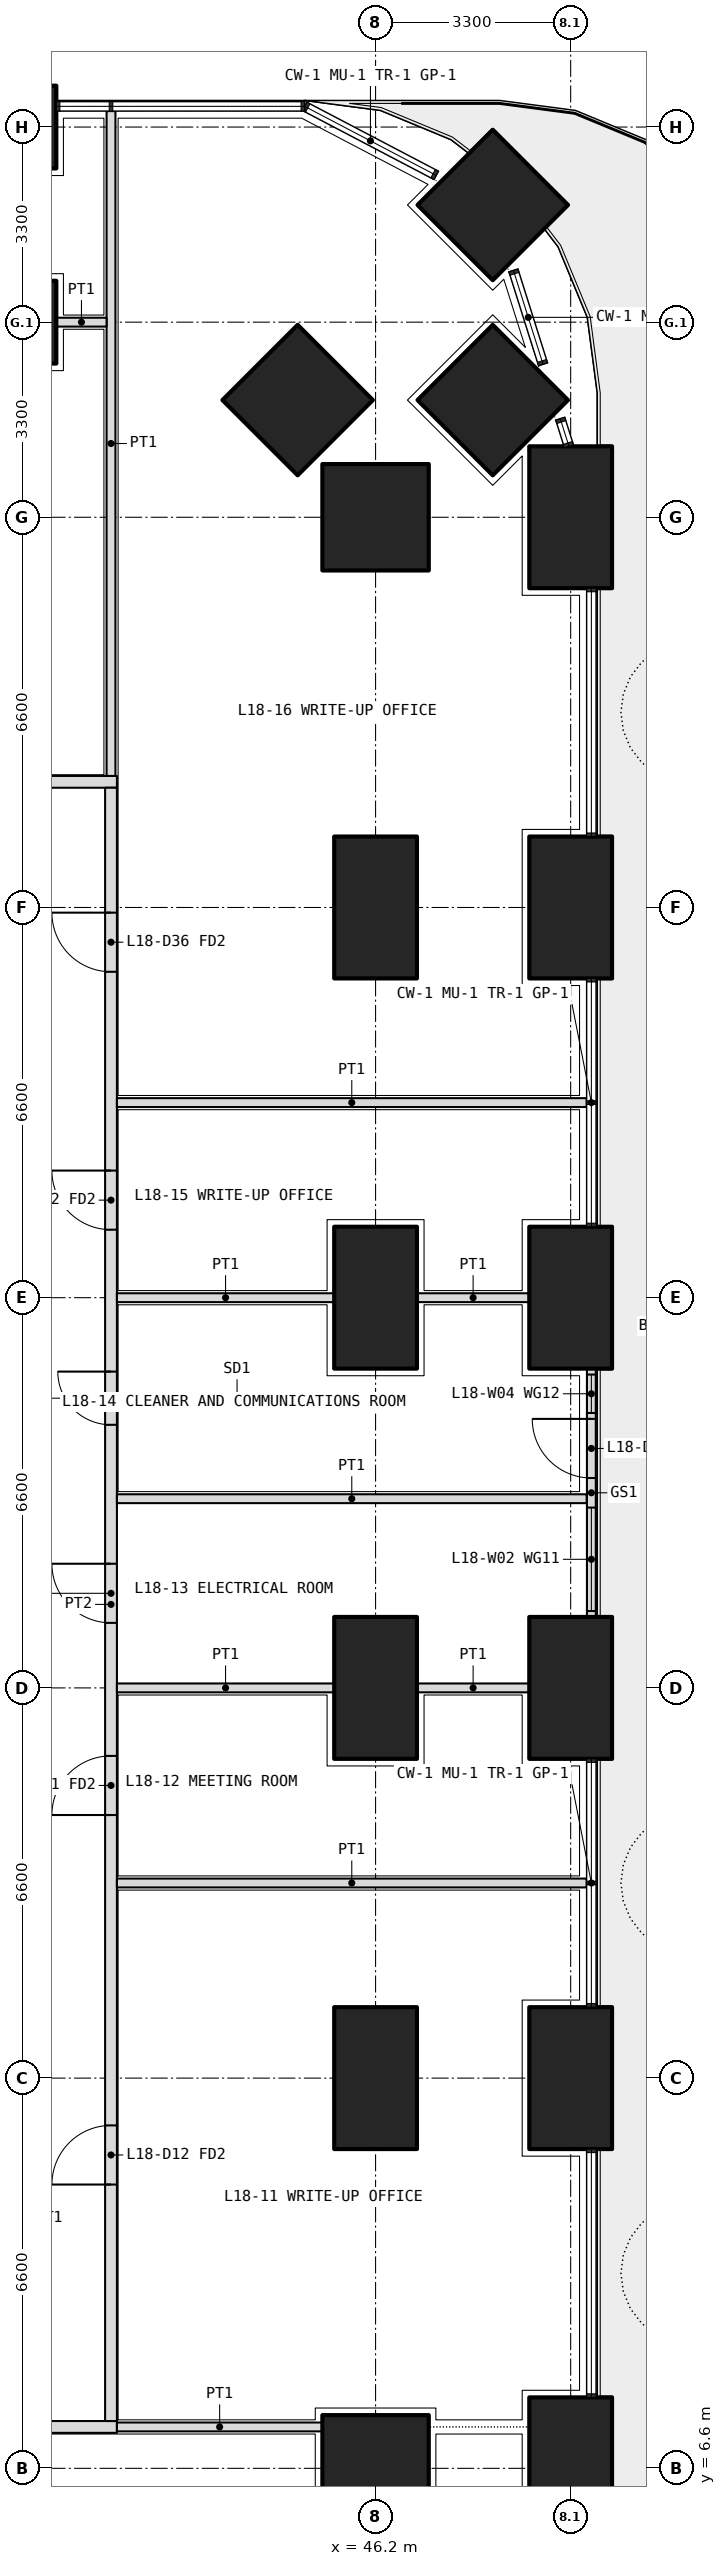
"""IFC4 building model, lengths in metres.
Left out: names, types, materials, properties, quantities, classifications, styles, units other than length and angle.
Written with IfcOpenShell. Run it as: python <this file> out.ifc"""

import sys

from ifc_helpers import new_model, si_unit, direction, frame, frame_2d, origin, origin_2d, place, context, subcontext, project, spatial, rectangle, extrude, element, fill, save


model = new_model("IFC4")
c1 = context("Model", 3, precision=1e-05, world=origin(), true_north=direction((0.0, 1.0)))
c2 = subcontext(c1, "Body", "Model", "MODEL_VIEW")
j1 = project(units=[si_unit("LENGTHUNIT", "METRE"), si_unit("PLANEANGLEUNIT", "RADIAN")], contexts=[c1])
p1 = place(None, origin())
s1 = spatial("IfcSite", under=j1, at=p1, CompositionType="ELEMENT")
p2 = place(p1, origin())
s2 = spatial("IfcBuilding", under=s1, at=p2, CompositionType="ELEMENT")
p3 = place(p2, frame((0.0, 0.0, 82.2)))
s3 = spatial("IfcBuildingStorey", under=s2, at=p3, CompositionType="ELEMENT", Elevation=82.2)
p4 = place(p3, frame((48.182, 44.882, 0.0), z_axis=(0.0, 0.0, 1.0), x_axis=(0.707106781187, 0.707106781187, 0.0)))
e1 = element("IfcColumn", 1, at=p4, inside=s3, PredefinedType="COLUMN", context=c2, shape_type="SweptSolid", body=[
    extrude(rectangle(XDim=1.8, YDim=1.8, at=origin_2d()), origin(), (0.0, 0.0, 1.0), 4.2),
])
for number, where, z_axis, x_axis in (
    (2, (49.5, 6.6, 0.0), (0.0, 0.0, 1.0), (0.0, 1.0, 0.0)),
    (3, (49.5, 13.2, 0.0), (0.0, 0.0, 1.0), (0.0, 1.0, 0.0)),
    (4, (49.5, 19.8, 0.0), (0.0, 0.0, 1.0), (0.0, 1.0, 0.0)),
    (5, (49.5, 26.4, 0.0), (0.0, 0.0, 1.0), (0.0, 1.0, 0.0)),
    (6, (49.5, 33.0, 0.0), (0.0, 0.0, 1.0), (0.0, 1.0, 0.0)),
    (7, (49.5, 39.6, 0.0), (0.0, 0.0, 1.0), (0.0, 1.0, 0.0)),
    (8, (39.6, 46.2, 0.0), (0.0, 0.0, 1.0), (1.0, 0.0, 0.0)),
):
    element("IfcColumn", number, at=place(p3, frame(where, z_axis=z_axis, x_axis=x_axis)), inside=s3, PredefinedType="COLUMN", context=c2, shape_type="SweptSolid", body=[
        extrude(rectangle(XDim=2.4, YDim=1.4, at=origin_2d()), origin(), (0.0, 0.0, 1.0), 4.2),
    ])
for number, where, z_axis, x_axis in (
    (9, (46.2, 6.6, 0.0), (0.0, 0.0, 1.0), (1.0, 0.0, 0.0)),
    (10, (46.2, 39.6, 0.0), (0.0, 0.0, 1.0), (1.0, 0.0, 0.0)),
    (11, (48.182, 41.582, 0.0), (0.0, 0.0, 1.0), (0.707, 0.707, 0.0)),
):
    element("IfcColumn", number, at=place(p3, frame(where, z_axis=z_axis, x_axis=x_axis)), inside=s3, PredefinedType="COLUMN", context=c2, shape_type="SweptSolid", body=[
        extrude(rectangle(XDim=1.8, YDim=1.8, at=origin_2d()), origin(), (0.0, 0.0, 1.0), 4.2),
    ])
p5 = place(p3, frame((39.6, 42.9, 0.0), z_axis=(0.0, 0.0, 1.0), x_axis=(1.0, 0.0, 0.0)))
e12 = element("IfcColumn", 12, at=p5, inside=s3, PredefinedType="COLUMN", context=c2, shape_type="SweptSolid", body=[
    extrude(rectangle(XDim=2.4, YDim=1.4, at=origin_2d()), origin(), (0.0, 0.0, 1.0), 4.2),
])
p6 = place(p3, frame((44.882, 41.582, 0.0), z_axis=(0.0, 0.0, 1.0), x_axis=(0.707106781187, 0.707106781187, 0.0)))
e13 = element("IfcColumn", 13, at=p6, inside=s3, PredefinedType="COLUMN", context=c2, shape_type="SweptSolid", body=[
    extrude(rectangle(XDim=1.8, YDim=1.8, at=origin_2d()), origin(), (0.0, 0.0, 1.0), 4.2),
])
for number, where, z_axis, x_axis in (
    (14, (46.2, 13.2, 0.0), (0.0, 0.0, 1.0), (0.0, 1.0, 0.0)),
    (15, (46.2, 19.8, 0.0), (0.0, 0.0, 1.0), (0.0, 1.0, 0.0)),
    (16, (46.2, 26.4, 0.0), (0.0, 0.0, 1.0), (0.0, 1.0, 0.0)),
    (17, (46.2, 33.0, 0.0), (0.0, 0.0, 1.0), (0.0, 1.0, 0.0)),
):
    element("IfcColumn", number, at=place(p3, frame(where, z_axis=z_axis, x_axis=x_axis)), inside=s3, PredefinedType="COLUMN", context=c2, shape_type="SweptSolid", body=[
        extrude(rectangle(XDim=2.4, YDim=1.4, at=origin_2d()), origin(), (0.0, 0.0, 1.0), 4.2),
    ])
p7 = place(p3, frame((49.85, 21.0, 0.0), z_axis=(0.0, 0.0, 1.0), x_axis=(0.0, 1.0, 0.0)))
e18 = element("IfcWall", 18, at=p7, inside=s3, PredefinedType="SOLIDWALL", context=c2, shape_type="SweptSolid", body=[
    extrude(rectangle(XDim=4.2, YDim=0.15, at=frame_2d((2.1, 0.0))), origin(), (0.0, 0.0, 1.0), 2.7),
])
p8 = place(p7, frame((2.35, 0.0, 0.0)))
e19 = element("IfcOpeningElement", 19, at=p8, cuts=e18, PredefinedType="OPENING", context=c2, shape_type="SweptSolid", body=[
    extrude(rectangle(XDim=1.0, YDim=2.4, at=frame_2d((0.5, 1.2))), frame((0.0, 0.085, 0.0), z_axis=(0.0, -1.0, 0.0), x_axis=(1.0, 0.0, 0.0)), (0.0, 0.0, 1.0), 0.17),
])
p9 = place(p7, frame((0.1, 0.0, 0.1)))
e20 = element("IfcOpeningElement", 20, at=p9, cuts=e18, PredefinedType="OPENING", context=c2, shape_type="SweptSolid", body=[
    extrude(rectangle(XDim=1.75, YDim=2.3, at=frame_2d((0.875, 1.15))), frame((0.0, 0.085, 0.0), z_axis=(0.0, -1.0, 0.0), x_axis=(1.0, 0.0, 0.0)), (0.0, 0.0, 1.0), 0.17),
])
p10 = place(p7, frame((3.45, 0.0, 0.1)))
e21 = element("IfcOpeningElement", 21, at=p10, cuts=e18, PredefinedType="OPENING", context=c2, shape_type="SweptSolid", body=[
    extrude(rectangle(XDim=0.65, YDim=2.3, at=frame_2d((0.325, 1.15))), frame((0.0, 0.085, 0.0), z_axis=(0.0, -1.0, 0.0), x_axis=(1.0, 0.0, 0.0)), (0.0, 0.0, 1.0), 0.17),
])
p11 = place(p3, frame((10.975, 7.3, 0.0), z_axis=(0.0, 0.0, 1.0), x_axis=(1.0, 0.0, 0.0)))
e22 = element("IfcWall", 22, at=p11, inside=s3, PredefinedType="PARTITIONING", context=c2, shape_type="SweptSolid", body=[
    extrude(rectangle(XDim=30.85, YDim=0.2, at=frame_2d((15.425, 0.0))), origin(), (0.0, 0.0, 1.0), 2.85),
])
p12 = place(p11, frame((2.212, 0.0, 0.0)))
e23 = element("IfcOpeningElement", 23, at=p12, cuts=e22, PredefinedType="OPENING", context=c2, shape_type="SweptSolid", body=[
    extrude(rectangle(XDim=1.2, YDim=2.1, at=frame_2d((0.6, 1.05))), frame((0.0, 0.11, 0.0), z_axis=(0.0, -1.0, 0.0), x_axis=(1.0, 0.0, 0.0)), (0.0, 0.0, 1.0), 0.22),
])
p13 = place(p11, frame((6.675, 0.0, 0.0)))
e24 = element("IfcOpeningElement", 24, at=p13, cuts=e22, PredefinedType="OPENING", context=c2, shape_type="SweptSolid", body=[
    extrude(rectangle(XDim=1.0, YDim=2.1, at=frame_2d((0.5, 1.05))), frame((0.0, 0.11, 0.0), z_axis=(0.0, -1.0, 0.0), x_axis=(1.0, 0.0, 0.0)), (0.0, 0.0, 1.0), 0.22),
])
p14 = place(p11, frame((10.425, 0.0, 0.0)))
e25 = element("IfcOpeningElement", 25, at=p14, cuts=e22, PredefinedType="OPENING", context=c2, shape_type="SweptSolid", body=[
    extrude(rectangle(XDim=1.0, YDim=2.1, at=frame_2d((0.5, 1.05))), frame((0.0, 0.11, 0.0), z_axis=(0.0, -1.0, 0.0), x_axis=(1.0, 0.0, 0.0)), (0.0, 0.0, 1.0), 0.22),
])
p15 = place(p11, frame((13.725, 0.0, 0.0)))
e26 = element("IfcOpeningElement", 26, at=p15, cuts=e22, PredefinedType="OPENING", context=c2, shape_type="SweptSolid", body=[
    extrude(rectangle(XDim=1.0, YDim=2.1, at=frame_2d((0.5, 1.05))), frame((0.0, 0.11, 0.0), z_axis=(0.0, -1.0, 0.0), x_axis=(1.0, 0.0, 0.0)), (0.0, 0.0, 1.0), 0.22),
])
p16 = place(p11, frame((16.475, 0.0, 0.0)))
e27 = element("IfcOpeningElement", 27, at=p16, cuts=e22, PredefinedType="OPENING", context=c2, shape_type="SweptSolid", body=[
    extrude(rectangle(XDim=1.2, YDim=2.1, at=frame_2d((0.6, 1.05))), frame((0.0, 0.11, 0.0), z_axis=(0.0, -1.0, 0.0), x_axis=(1.0, 0.0, 0.0)), (0.0, 0.0, 1.0), 0.22),
])
p17 = place(p11, frame((24.238, 0.0, 0.0)))
e28 = element("IfcOpeningElement", 28, at=p17, cuts=e22, PredefinedType="OPENING", context=c2, shape_type="SweptSolid", body=[
    extrude(rectangle(XDim=1.0, YDim=2.1, at=frame_2d((0.5, 1.05))), frame((0.0, 0.11, 0.0), z_axis=(0.0, -1.0, 0.0), x_axis=(1.0, 0.0, 0.0)), (0.0, 0.0, 1.0), 0.22),
])
p18 = place(p3, frame((10.975, 35.125, 0.0), z_axis=(0.0, 0.0, 1.0), x_axis=(1.0, 0.0, 0.0)))
e29 = element("IfcWall", 29, at=p18, inside=s3, PredefinedType="PARTITIONING", context=c2, shape_type="SweptSolid", body=[
    extrude(rectangle(XDim=30.85, YDim=0.2, at=frame_2d((15.425, 0.0))), origin(), (0.0, 0.0, 1.0), 2.85),
])
p19 = place(p18, frame((2.212, 0.0, 0.0)))
e30 = element("IfcOpeningElement", 30, at=p19, cuts=e29, PredefinedType="OPENING", context=c2, shape_type="SweptSolid", body=[
    extrude(rectangle(XDim=1.2, YDim=2.1, at=frame_2d((0.6, 1.05))), frame((0.0, 0.11, 0.0), z_axis=(0.0, -1.0, 0.0), x_axis=(1.0, 0.0, 0.0)), (0.0, 0.0, 1.0), 0.22),
])
p20 = place(p18, frame((8.225, 0.0, 0.0)))
e31 = element("IfcOpeningElement", 31, at=p20, cuts=e29, PredefinedType="OPENING", context=c2, shape_type="SweptSolid", body=[
    extrude(rectangle(XDim=1.2, YDim=2.1, at=frame_2d((0.6, 1.05))), frame((0.0, 0.11, 0.0), z_axis=(0.0, -1.0, 0.0), x_axis=(1.0, 0.0, 0.0)), (0.0, 0.0, 1.0), 0.22),
])
p21 = place(p18, frame((14.825, 0.0, 0.0)))
e32 = element("IfcOpeningElement", 32, at=p21, cuts=e29, PredefinedType="OPENING", context=c2, shape_type="SweptSolid", body=[
    extrude(rectangle(XDim=1.2, YDim=2.1, at=frame_2d((0.6, 1.05))), frame((0.0, 0.11, 0.0), z_axis=(0.0, -1.0, 0.0), x_axis=(1.0, 0.0, 0.0)), (0.0, 0.0, 1.0), 0.22),
])
p22 = place(p18, frame((19.775, 0.0, 0.0)))
e33 = element("IfcOpeningElement", 33, at=p22, cuts=e29, PredefinedType="OPENING", context=c2, shape_type="SweptSolid", body=[
    extrude(rectangle(XDim=1.2, YDim=2.1, at=frame_2d((0.6, 1.05))), frame((0.0, 0.11, 0.0), z_axis=(0.0, -1.0, 0.0), x_axis=(1.0, 0.0, 0.0)), (0.0, 0.0, 1.0), 0.22),
])
p23 = place(p18, frame((25.788, 0.0, 0.0)))
e34 = element("IfcOpeningElement", 34, at=p23, cuts=e29, PredefinedType="OPENING", context=c2, shape_type="SweptSolid", body=[
    extrude(rectangle(XDim=1.2, YDim=2.1, at=frame_2d((0.6, 1.05))), frame((0.0, 0.11, 0.0), z_axis=(0.0, -1.0, 0.0), x_axis=(1.0, 0.0, 0.0)), (0.0, 0.0, 1.0), 0.22),
])
p24 = place(p3, frame((41.725, 7.4, 0.0), z_axis=(0.0, 0.0, 1.0), x_axis=(0.0, 1.0, 0.0)))
e35 = element("IfcWall", 35, at=p24, inside=s3, PredefinedType="PARTITIONING", context=c2, shape_type="SweptSolid", body=[
    extrude(rectangle(XDim=27.625, YDim=0.2, at=frame_2d((13.812, 0.0))), origin(), (0.0, 0.0, 1.0), 2.85),
])
p25 = place(p24, frame((4.0, 0.0, 0.0)))
e36 = element("IfcOpeningElement", 36, at=p25, cuts=e35, PredefinedType="OPENING", context=c2, shape_type="SweptSolid", body=[
    extrude(rectangle(XDim=1.0, YDim=2.1, at=frame_2d((0.5, 1.05))), frame((0.0, 0.11, 0.0), z_axis=(0.0, -1.0, 0.0), x_axis=(1.0, 0.0, 0.0)), (0.0, 0.0, 1.0), 0.22),
])
p26 = place(p24, frame((10.25, 0.0, 0.0)))
e37 = element("IfcOpeningElement", 37, at=p26, cuts=e35, PredefinedType="OPENING", context=c2, shape_type="SweptSolid", body=[
    extrude(rectangle(XDim=1.0, YDim=2.1, at=frame_2d((0.5, 1.05))), frame((0.0, 0.11, 0.0), z_axis=(0.0, -1.0, 0.0), x_axis=(1.0, 0.0, 0.0)), (0.0, 0.0, 1.0), 0.22),
])
p27 = place(p24, frame((13.5, 0.0, 0.0)))
e38 = element("IfcOpeningElement", 38, at=p27, cuts=e35, PredefinedType="OPENING", context=c2, shape_type="SweptSolid", body=[
    extrude(rectangle(XDim=1.0, YDim=2.1, at=frame_2d((0.5, 1.05))), frame((0.0, 0.11, 0.0), z_axis=(0.0, -1.0, 0.0), x_axis=(1.0, 0.0, 0.0)), (0.0, 0.0, 1.0), 0.22),
])
p28 = place(p24, frame((16.85, 0.0, 0.0)))
e39 = element("IfcOpeningElement", 39, at=p28, cuts=e35, PredefinedType="OPENING", context=c2, shape_type="SweptSolid", body=[
    extrude(rectangle(XDim=0.9, YDim=2.1, at=frame_2d((0.45, 1.05))), frame((0.0, 0.11, 0.0), z_axis=(0.0, -1.0, 0.0), x_axis=(1.0, 0.0, 0.0)), (0.0, 0.0, 1.0), 0.22),
])
p29 = place(p24, frame((20.15, 0.0, 0.0)))
e40 = element("IfcOpeningElement", 40, at=p29, cuts=e35, PredefinedType="OPENING", context=c2, shape_type="SweptSolid", body=[
    extrude(rectangle(XDim=1.0, YDim=2.1, at=frame_2d((0.5, 1.05))), frame((0.0, 0.11, 0.0), z_axis=(0.0, -1.0, 0.0), x_axis=(1.0, 0.0, 0.0)), (0.0, 0.0, 1.0), 0.22),
])
p30 = place(p24, frame((24.512, 0.0, 0.0)))
e41 = element("IfcOpeningElement", 41, at=p30, cuts=e35, PredefinedType="OPENING", context=c2, shape_type="SweptSolid", body=[
    extrude(rectangle(XDim=1.0, YDim=2.1, at=frame_2d((0.5, 1.05))), frame((0.0, 0.11, 0.0), z_axis=(0.0, -1.0, 0.0), x_axis=(1.0, 0.0, 0.0)), (0.0, 0.0, 1.0), 0.22),
])
p31 = place(p3, frame((45.3, 7.3, 0.0), z_axis=(0.0, 0.0, 1.0), x_axis=(-1.0, 0.0, 0.0)))
e42 = element("IfcWall", 42, at=p31, inside=s3, PredefinedType="PARTITIONING", context=c2, shape_type="SweptSolid", body=[
    extrude(rectangle(XDim=3.475, YDim=0.15, at=frame_2d((1.738, 0.0))), origin(), (0.0, 0.0, 1.0), 2.85),
])
p32 = place(p3, frame((41.725, 46.47, 0.0), z_axis=(0.0, 0.0, 1.0), x_axis=(0.0, -1.0, 0.0)))
e43 = element("IfcWall", 43, at=p32, inside=s3, PredefinedType="PARTITIONING", context=c2, shape_type="SweptSolid", body=[
    extrude(rectangle(XDim=11.245, YDim=0.15, at=frame_2d((5.623, 0.0))), origin(), (0.0, 0.0, 1.0), 2.7),
])
p33 = place(p3, frame((49.77, 23.0, 0.0), z_axis=(0.0, 0.0, 1.0), x_axis=(-1.0, 0.0, 0.0)))
e44 = element("IfcWall", 44, at=p33, inside=s3, PredefinedType="PARTITIONING", context=c2, shape_type="SweptSolid", body=[
    extrude(rectangle(XDim=7.945, YDim=0.15, at=frame_2d((3.973, 0.0))), origin(), (0.0, 0.0, 1.0), 2.7),
])
p34 = place(p3, frame((48.8, 26.4, 0.0), z_axis=(0.0, 0.0, 1.0), x_axis=(-1.0, 0.0, 0.0)))
e45 = element("IfcWall", 45, at=p34, inside=s3, PredefinedType="PARTITIONING", context=c2, shape_type="SweptSolid", body=[
    extrude(rectangle(XDim=1.9, YDim=0.15, at=frame_2d((0.95, 0.0))), origin(), (0.0, 0.0, 1.0), 2.85),
])
p35 = place(p3, frame((45.5, 26.4, 0.0), z_axis=(0.0, 0.0, 1.0), x_axis=(-1.0, 0.0, 0.0)))
e46 = element("IfcWall", 46, at=p35, inside=s3, PredefinedType="PARTITIONING", context=c2, shape_type="SweptSolid", body=[
    extrude(rectangle(XDim=3.675, YDim=0.15, at=frame_2d((1.837, 0.0))), origin(), (0.0, 0.0, 1.0), 2.85),
])
p36 = place(p3, frame((49.77, 16.5, 0.0), z_axis=(0.0, 0.0, 1.0), x_axis=(-1.0, 0.0, 0.0)))
e47 = element("IfcWall", 47, at=p36, inside=s3, PredefinedType="PARTITIONING", context=c2, shape_type="SweptSolid", body=[
    extrude(rectangle(XDim=7.945, YDim=0.15, at=frame_2d((3.973, 0.0))), origin(), (0.0, 0.0, 1.0), 2.7),
])
p37 = place(p3, frame((48.8, 19.8, 0.0), z_axis=(0.0, 0.0, 1.0), x_axis=(-1.0, 0.0, 0.0)))
e48 = element("IfcWall", 48, at=p37, inside=s3, PredefinedType="PARTITIONING", context=c2, shape_type="SweptSolid", body=[
    extrude(rectangle(XDim=1.9, YDim=0.15, at=frame_2d((0.95, 0.0))), origin(), (0.0, 0.0, 1.0), 2.85),
])
p38 = place(p3, frame((45.5, 19.8, 0.0), z_axis=(0.0, 0.0, 1.0), x_axis=(-1.0, 0.0, 0.0)))
e49 = element("IfcWall", 49, at=p38, inside=s3, PredefinedType="PARTITIONING", context=c2, shape_type="SweptSolid", body=[
    extrude(rectangle(XDim=3.675, YDim=0.15, at=frame_2d((1.837, 0.0))), origin(), (0.0, 0.0, 1.0), 2.85),
])
p39 = place(p3, frame((49.77, 29.7, 0.0), z_axis=(0.0, 0.0, 1.0), x_axis=(-1.0, 0.0, 0.0)))
e50 = element("IfcWall", 50, at=p39, inside=s3, PredefinedType="PARTITIONING", context=c2, shape_type="SweptSolid", body=[
    extrude(rectangle(XDim=7.945, YDim=0.15, at=frame_2d((3.973, 0.0))), origin(), (0.0, 0.0, 1.0), 2.7),
])
p40 = place(p3, frame((41.65, 42.9, 0.0), z_axis=(0.0, 0.0, 1.0), x_axis=(-1.0, 0.0, 0.0)))
e51 = element("IfcWall", 51, at=p40, inside=s3, PredefinedType="PARTITIONING", context=c2, shape_type="SweptSolid", body=[
    extrude(rectangle(XDim=0.85, YDim=0.15, at=frame_2d((0.425, 0.0))), origin(), (0.0, 0.0, 1.0), 3.9),
])
p41 = place(p8, origin())
e52 = element("IfcDoor", 52, at=p41, inside=s3, OperationType="SINGLE_SWING_RIGHT", PredefinedType="DOOR", context=c2, shape_type="SweptSolid", body=[
    extrude(rectangle(XDim=1.0, YDim=2.4, at=frame_2d((0.5, 1.2))), frame((0.0, 0.025, 0.0), z_axis=(0.0, -1.0, 0.0), x_axis=(1.0, 0.0, 0.0)), (0.0, 0.0, 1.0), 0.05),
])
fill(e19, e52)
p42 = place(p9, origin())
e53 = element("IfcWindow", 53, at=p42, inside=s3, PartitioningType="SINGLE_PANEL", PredefinedType="WINDOW", context=c2, shape_type="SweptSolid", body=[
    extrude(rectangle(XDim=1.75, YDim=2.3, at=frame_2d((0.875, 1.15))), frame((0.0, 0.03, 0.0), z_axis=(0.0, -1.0, 0.0), x_axis=(1.0, 0.0, 0.0)), (0.0, 0.0, 1.0), 0.06),
])
fill(e20, e53)
p43 = place(p10, origin())
e54 = element("IfcWindow", 54, at=p43, inside=s3, PartitioningType="SINGLE_PANEL", PredefinedType="WINDOW", context=c2, shape_type="SweptSolid", body=[
    extrude(rectangle(XDim=0.65, YDim=2.3, at=frame_2d((0.325, 1.15))), frame((0.0, 0.03, 0.0), z_axis=(0.0, -1.0, 0.0), x_axis=(1.0, 0.0, 0.0)), (0.0, 0.0, 1.0), 0.06),
])
fill(e21, e54)
p44 = place(p25, origin())
e55 = element("IfcDoor", 55, at=p44, inside=s3, OperationType="SINGLE_SWING_LEFT", PredefinedType="DOOR", context=c2, shape_type="SweptSolid", body=[
    extrude(rectangle(XDim=1.0, YDim=2.1, at=frame_2d((0.5, 1.05))), frame((0.0, 0.025, 0.0), z_axis=(0.0, -1.0, 0.0), x_axis=(1.0, 0.0, 0.0)), (0.0, 0.0, 1.0), 0.05),
])
fill(e36, e55)
p45 = place(p26, origin())
e56 = element("IfcDoor", 56, at=p45, inside=s3, OperationType="SINGLE_SWING_LEFT", PredefinedType="DOOR", context=c2, shape_type="SweptSolid", body=[
    extrude(rectangle(XDim=1.0, YDim=2.1, at=frame_2d((0.5, 1.05))), frame((0.0, 0.025, 0.0), z_axis=(0.0, -1.0, 0.0), x_axis=(1.0, 0.0, 0.0)), (0.0, 0.0, 1.0), 0.05),
])
fill(e37, e56)
p46 = place(p27, origin())
e57 = element("IfcDoor", 57, at=p46, inside=s3, OperationType="SINGLE_SWING_RIGHT", PredefinedType="DOOR", context=c2, shape_type="SweptSolid", body=[
    extrude(rectangle(XDim=1.0, YDim=2.1, at=frame_2d((0.5, 1.05))), frame((0.0, 0.025, 0.0), z_axis=(0.0, -1.0, 0.0), x_axis=(1.0, 0.0, 0.0)), (0.0, 0.0, 1.0), 0.05),
])
fill(e38, e57)
p47 = place(p28, origin())
e58 = element("IfcDoor", 58, at=p47, inside=s3, OperationType="SINGLE_SWING_RIGHT", PredefinedType="DOOR", context=c2, shape_type="SweptSolid", body=[
    extrude(rectangle(XDim=0.9, YDim=2.1, at=frame_2d((0.45, 1.05))), frame((0.0, 0.025, 0.0), z_axis=(0.0, -1.0, 0.0), x_axis=(1.0, 0.0, 0.0)), (0.0, 0.0, 1.0), 0.05),
])
fill(e39, e58)
p48 = place(p29, origin())
e59 = element("IfcDoor", 59, at=p48, inside=s3, OperationType="SINGLE_SWING_RIGHT", PredefinedType="DOOR", context=c2, shape_type="SweptSolid", body=[
    extrude(rectangle(XDim=1.0, YDim=2.1, at=frame_2d((0.5, 1.05))), frame((0.0, 0.025, 0.0), z_axis=(0.0, -1.0, 0.0), x_axis=(1.0, 0.0, 0.0)), (0.0, 0.0, 1.0), 0.05),
])
fill(e40, e59)
p49 = place(p30, origin())
e60 = element("IfcDoor", 60, at=p49, inside=s3, OperationType="SINGLE_SWING_RIGHT", PredefinedType="DOOR", context=c2, shape_type="SweptSolid", body=[
    extrude(rectangle(XDim=1.0, YDim=2.1, at=frame_2d((0.5, 1.05))), frame((0.0, 0.025, 0.0), z_axis=(0.0, -1.0, 0.0), x_axis=(1.0, 0.0, 0.0)), (0.0, 0.0, 1.0), 0.05),
])
fill(e41, e60)
save(model, sys.argv[1])
